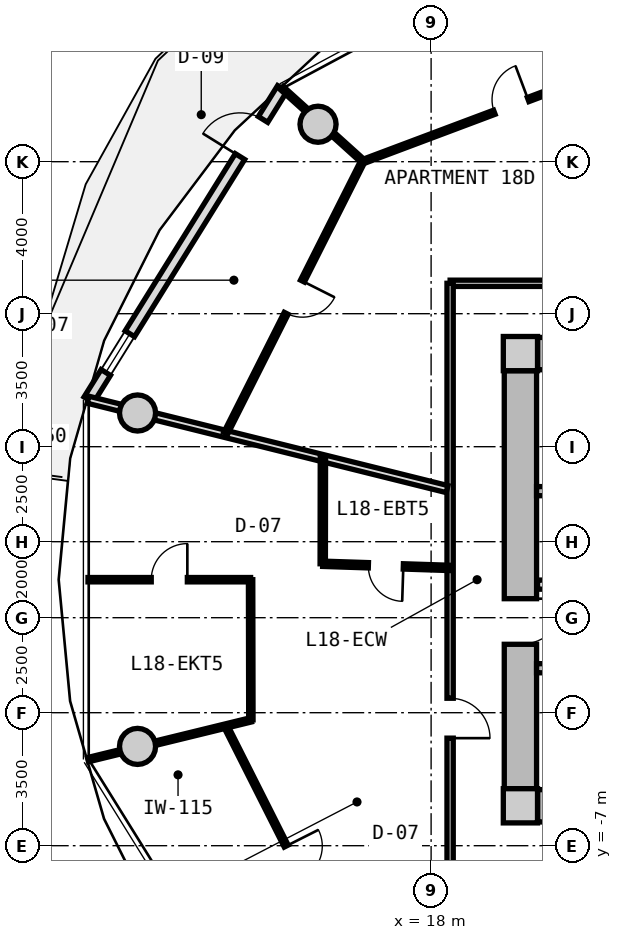
"""IFC4 building model, lengths in metres.
Left out: names, types, materials, properties, quantities, classifications, styles, units other than length and angle.
Written with IfcOpenShell. Run it as: python <this file> out.ifc"""

import sys

from ifc_helpers import new_model, si_unit, direction, frame, frame_2d, origin, origin_2d, place, context, subcontext, project, spatial, rectangle, circle, extrude, source, transform, mapped, element, fill, save


model = new_model("IFC4")
c1 = context("Model", 3, precision=1e-05, world=origin(), true_north=direction((0.0, 1.0)))
c2 = subcontext(c1, "Body", "Model", "MODEL_VIEW")
j1 = project(units=[si_unit("LENGTHUNIT", "METRE"), si_unit("PLANEANGLEUNIT", "RADIAN")], contexts=[c1])
p1 = place(None, origin())
s1 = spatial("IfcSite", under=j1, at=p1, CompositionType="ELEMENT")
p2 = place(p1, origin())
s2 = spatial("IfcBuilding", under=s1, at=p2, CompositionType="ELEMENT")
p3 = place(p2, frame((0.0, 0.0, 61.25)))
s3 = spatial("IfcBuildingStorey", under=s2, at=p3, CompositionType="ELEMENT", Elevation=61.25)
m1 = source(origin(), c2, "Body", "SweptSolid", [
    extrude(rectangle(XDim=0.9, YDim=0.9, at=origin_2d()), origin(), (0.0, 0.0, 1.0), 3.05),
])
for number, where, z_axis, x_axis in (
    (1, (20.35, -5.95, 0.0), (0.0, 0.0, 1.0), (1.0, 0.0, 0.0)),
    (2, (20.35, 5.95, 0.0), (0.0, 0.0, 1.0), (1.0, 0.0, 0.0)),
):
    element("IfcColumn", number, at=place(p3, frame(where, z_axis=z_axis, x_axis=x_axis)), inside=s3, PredefinedType="COLUMN", context=c2, shape_type="MappedRepresentation", body=[
        mapped(m1, transform((0.0, 0.0, 0.0), x_axis=(1.0, 0.0, 0.0), y_axis=(0.0, 1.0, 0.0), z_axis=(0.0, 0.0, 1.0), scale=1.0)),
    ])
m2 = source(origin(), c2, "Body", "SweptSolid", [
    extrude(rectangle(XDim=14.4, YDim=0.85, at=frame_2d((7.2, 0.0))), origin(), (0.0, 0.0, 1.0), 2.79),
])
for number, where, z_axis, x_axis in (
    (3, (20.8, 5.95, 0.0), (0.0, 0.0, 1.0), (1.0, 0.0, 0.0)),
    (4, (35.2, -5.95, 0.0), (0.0, 0.0, 1.0), (-1.0, 0.0, 0.0)),
):
    element("IfcWall", number, at=place(p3, frame(where, z_axis=z_axis, x_axis=x_axis)), inside=s3, PredefinedType="SHEAR", context=c2, shape_type="MappedRepresentation", body=[
        mapped(m2, transform((0.0, 0.0, 0.0), x_axis=(1.0, 0.0, 0.0), y_axis=(0.0, 1.0, 0.0), z_axis=(0.0, 0.0, 1.0), scale=1.0)),
    ])
m3 = source(origin(), c2, "Body", "SweptSolid", [
    extrude(rectangle(XDim=11.0, YDim=0.85, at=frame_2d((5.5, 0.0))), origin(), (0.0, 0.0, 1.0), 2.79),
])
p4 = place(p3, frame((20.35, -5.5, 0.0), z_axis=(0.0, 0.0, 1.0), x_axis=(0.0, 1.0, 0.0)))
e5 = element("IfcWall", 5, at=p4, inside=s3, PredefinedType="SHEAR", context=c2, shape_type="MappedRepresentation", body=[
    mapped(m3, transform((0.0, 0.0, 0.0), x_axis=(1.0, 0.0, 0.0), y_axis=(0.0, 1.0, 0.0), z_axis=(0.0, 0.0, 1.0), scale=1.0)),
])
p5 = place(p4, frame((3.8, 0.0, 0.0)))
e6 = element("IfcOpeningElement", 6, at=p5, cuts=e5, PredefinedType="OPENING", context=c2, shape_type="SweptSolid", body=[
    extrude(rectangle(XDim=1.2, YDim=2.15, at=frame_2d((0.6, 1.075))), frame((0.0, 0.435, 0.0), z_axis=(0.0, -1.0, 0.0), x_axis=(1.0, 0.0, 0.0)), (0.0, 0.0, 1.0), 0.87),
])
m4 = source(origin(), c2, "Body", "SweptSolid", [
    extrude(circle(Radius=0.475, at=origin_2d()), origin(), (0.0, 0.0, 1.0), 3.05),
])
for number, where, z_axis, x_axis in (
    (7, (15.025, 11.985, 0.0), (0.0, 0.0, 1.0), (1.0, 0.0, 0.0)),
    (8, (10.275, 4.387, 0.0), (0.0, 0.0, 1.0), (1.0, 0.0, 0.0)),
    (9, (10.275, -4.387, 0.0), (0.0, 0.0, 1.0), (1.0, 0.0, 0.0)),
):
    element("IfcColumn", number, at=place(p3, frame(where, z_axis=z_axis, x_axis=x_axis)), inside=s3, PredefinedType="COLUMN", context=c2, shape_type="MappedRepresentation", body=[
        mapped(m4, transform((0.0, 0.0, 0.0), x_axis=(1.0, 0.0, 0.0), y_axis=(0.0, 1.0, 0.0), z_axis=(0.0, 0.0, 1.0), scale=1.0)),
    ])
m5 = source(origin(), c2, "Body", "SweptSolid", [
    extrude(rectangle(XDim=9.649, YDim=0.29, at=frame_2d((4.824, 0.0))), origin(), (0.0, 0.0, 1.0), 2.79),
])
p6 = place(p3, frame((8.99, 4.731, 0.0), z_axis=(0.0, 0.0, 1.0), x_axis=(0.527909458386, 0.849300655684, 0.0)))
e10 = element("IfcWall", 10, at=p6, inside=s3, PredefinedType="SOLIDWALL", context=c2, shape_type="MappedRepresentation", body=[
    mapped(m5, transform((0.0, 0.0, 0.0), x_axis=(1.0, 0.0, 0.0), y_axis=(0.0, 1.0, 0.0), z_axis=(0.0, 0.0, 1.0), scale=1.0)),
])
p7 = place(p6, frame((7.54, 0.0, 0.0)))
e11 = element("IfcOpeningElement", 11, at=p7, cuts=e10, PredefinedType="OPENING", context=c2, shape_type="SweptSolid", body=[
    extrude(rectangle(XDim=1.15, YDim=2.25, at=frame_2d((0.575, 1.125))), frame((0.0, 0.155, 0.0), z_axis=(0.0, -1.0, 0.0), x_axis=(1.0, 0.0, 0.0)), (0.0, 0.0, 1.0), 0.31),
])
p8 = place(p6, frame((0.85, 0.0, 0.85)))
e12 = element("IfcOpeningElement", 12, at=p8, cuts=e10, PredefinedType="OPENING", context=c2, shape_type="SweptSolid", body=[
    extrude(rectangle(XDim=1.2, YDim=1.5, at=frame_2d((0.6, 0.75))), frame((0.0, 0.155, 0.0), z_axis=(0.0, -1.0, 0.0), x_axis=(1.0, 0.0, 0.0)), (0.0, 0.0, 1.0), 0.31),
])
m6 = source(origin(), c2, "Body", "SweptSolid", [
    extrude(rectangle(XDim=7.765, YDim=0.24, at=frame_2d((3.883, 0.0))), origin(), (0.0, 0.0, 1.0), 2.79),
])
p9 = place(p3, frame((20.775, 2.33, 0.0), z_axis=(0.0, 0.0, 1.0), x_axis=(1.0, 0.0, 0.0)))
e13 = element("IfcWall", 13, at=p9, inside=s3, PredefinedType="PARTITIONING", context=c2, shape_type="MappedRepresentation", body=[
    mapped(m6, transform((0.0, 0.0, 0.0), x_axis=(1.0, 0.0, 0.0), y_axis=(0.0, 1.0, 0.0), z_axis=(0.0, 0.0, 1.0), scale=1.0)),
])
p10 = place(p3, frame((20.775, -2.33, 0.0), z_axis=(0.0, 0.0, 1.0), x_axis=(1.0, 0.0, 0.0)))
e14 = element("IfcWall", 14, at=p10, inside=s3, PredefinedType="PARTITIONING", context=c2, shape_type="MappedRepresentation", body=[
    mapped(m6, transform((0.0, 0.0, 0.0), x_axis=(1.0, 0.0, 0.0), y_axis=(0.0, 1.0, 0.0), z_axis=(0.0, 0.0, 1.0), scale=1.0)),
])
p11 = place(p10, frame((0.885, 0.0, 0.0)))
e15 = element("IfcOpeningElement", 15, at=p11, cuts=e14, PredefinedType="OPENING", context=c2, shape_type="SweptSolid", body=[
    extrude(rectangle(XDim=1.1, YDim=2.15, at=frame_2d((0.55, 1.075))), frame((0.0, 0.13, 0.0), z_axis=(0.0, -1.0, 0.0), x_axis=(1.0, 0.0, 0.0)), (0.0, 0.0, 1.0), 0.26),
])
m7 = source(origin(), c2, "Body", "SweptSolid", [
    extrude(rectangle(XDim=7.62, YDim=0.24, at=frame_2d((3.81, 0.0))), origin(), (0.0, 0.0, 1.0), 2.775),
])
p12 = place(p3, frame((20.8, -0.13, 0.0), z_axis=(0.0, 0.0, 1.0), x_axis=(1.0, 0.0, 0.0)))
e16 = element("IfcWall", 16, at=p12, inside=s3, PredefinedType="PARTITIONING", context=c2, shape_type="MappedRepresentation", body=[
    mapped(m7, transform((0.0, 0.0, 0.0), x_axis=(1.0, 0.0, 0.0), y_axis=(0.0, 1.0, 0.0), z_axis=(0.0, 0.0, 1.0), scale=1.0)),
])
p13 = place(p12, frame((6.22, 0.0, 0.0)))
e17 = element("IfcOpeningElement", 17, at=p13, cuts=e16, PredefinedType="OPENING", context=c2, shape_type="SweptSolid", body=[
    extrude(rectangle(XDim=1.0, YDim=2.1, at=frame_2d((0.5, 1.05))), frame((0.0, 0.13, 0.0), z_axis=(0.0, -1.0, 0.0), x_axis=(1.0, 0.0, 0.0)), (0.0, 0.0, 1.0), 0.26),
])
p14 = place(p12, frame((0.85, 0.0, 0.0)))
e18 = element("IfcOpeningElement", 18, at=p14, cuts=e16, PredefinedType="OPENING", context=c2, shape_type="SweptSolid", body=[
    extrude(rectangle(XDim=1.1, YDim=2.2, at=frame_2d((0.55, 1.1))), frame((0.0, 0.13, 0.0), z_axis=(0.0, -1.0, 0.0), x_axis=(1.0, 0.0, 0.0)), (0.0, 0.0, 1.0), 0.26),
])
p15 = place(p12, frame((3.85, 0.0, 0.0)))
e19 = element("IfcOpeningElement", 19, at=p15, cuts=e16, PredefinedType="OPENING", context=c2, shape_type="SweptSolid", body=[
    extrude(rectangle(XDim=1.1, YDim=2.2, at=frame_2d((0.55, 1.1))), frame((0.0, 0.13, 0.0), z_axis=(0.0, -1.0, 0.0), x_axis=(1.0, 0.0, 0.0)), (0.0, 0.0, 1.0), 0.26),
])
m8 = source(origin(), c2, "Body", "SweptSolid", [
    extrude(rectangle(XDim=19.0, YDim=0.165, at=frame_2d((9.5, 0.0))), origin(), (0.0, 0.0, 1.0), 2.775),
])
p16 = place(p3, frame((18.5, 7.8, 0.0), z_axis=(0.0, 0.0, 1.0), x_axis=(1.0, 0.0, 0.0)))
e20 = element("IfcWall", 20, at=p16, inside=s3, PredefinedType="PARTITIONING", context=c2, shape_type="MappedRepresentation", body=[
    mapped(m8, transform((0.0, 0.0, 0.0), x_axis=(1.0, 0.0, 0.0), y_axis=(0.0, 1.0, 0.0), z_axis=(0.0, 0.0, 1.0), scale=1.0)),
])
p17 = place(p16, frame((6.961, 0.0, 0.0)))
e21 = element("IfcOpeningElement", 21, at=p17, cuts=e20, PredefinedType="OPENING", context=c2, shape_type="SweptSolid", body=[
    extrude(rectangle(XDim=1.05, YDim=2.15, at=frame_2d((0.525, 1.075))), frame((0.0, 0.093, 0.0), z_axis=(0.0, -1.0, 0.0), x_axis=(1.0, 0.0, 0.0)), (0.0, 0.0, 1.0), 0.185),
])
m9 = source(origin(), c2, "Body", "SweptSolid", [
    extrude(rectangle(XDim=15.6, YDim=0.165, at=frame_2d((7.8, 0.0))), origin(), (0.0, 0.0, 1.0), 2.775),
])
p18 = place(p3, frame((18.5, -7.8, 0.0), z_axis=(0.0, 0.0, 1.0), x_axis=(0.0, 1.0, 0.0)))
e22 = element("IfcWall", 22, at=p18, inside=s3, PredefinedType="PARTITIONING", context=c2, shape_type="MappedRepresentation", body=[
    mapped(m9, transform((0.0, 0.0, 0.0), x_axis=(1.0, 0.0, 0.0), y_axis=(0.0, 1.0, 0.0), z_axis=(0.0, 0.0, 1.0), scale=1.0)),
])
p19 = place(p18, frame((3.63, 0.0, 0.0)))
e23 = element("IfcOpeningElement", 23, at=p19, cuts=e22, PredefinedType="OPENING", context=c2, shape_type="SweptSolid", body=[
    extrude(rectangle(XDim=1.05, YDim=2.15, at=frame_2d((0.525, 1.075))), frame((0.0, 0.093, 0.0), z_axis=(0.0, -1.0, 0.0), x_axis=(1.0, 0.0, 0.0)), (0.0, 0.0, 1.0), 0.185),
])
m10 = source(origin(), c2, "Body", "SweptSolid", [
    extrude(rectangle(XDim=9.737, YDim=0.19, at=frame_2d((4.869, 0.0))), origin(), (0.0, 0.0, 1.0), 2.225),
])
p20 = place(p3, frame((18.42, 2.385, 0.0), z_axis=(0.0, 0.0, 1.0), x_axis=(-0.970392716238, 0.241532557375, 0.0)))
e24 = element("IfcWall", 24, at=p20, inside=s3, PredefinedType="PARTITIONING", context=c2, shape_type="MappedRepresentation", body=[
    mapped(m10, transform((0.0, 0.0, 0.0), x_axis=(1.0, 0.0, 0.0), y_axis=(0.0, 1.0, 0.0), z_axis=(0.0, 0.0, 1.0), scale=1.0)),
])
m11 = source(origin(), c2, "Body", "SweptSolid", [
    extrude(rectangle(XDim=8.018, YDim=0.115, at=frame_2d((4.009, 0.0))), origin(), (0.0, 0.0, 1.0), 2.775),
])
p21 = place(p3, frame((12.596, -3.854, 0.0), z_axis=(0.0, 0.0, 1.0), x_axis=(0.450134355233, -0.89296084026, 0.0)))
e25 = element("IfcWall", 25, at=p21, inside=s3, PredefinedType="PARTITIONING", context=c2, shape_type="MappedRepresentation", body=[
    mapped(m11, transform((0.0, 0.0, 0.0), x_axis=(1.0, 0.0, 0.0), y_axis=(0.0, 1.0, 0.0), z_axis=(0.0, 0.0, 1.0), scale=1.0)),
])
p22 = place(p21, frame((3.534, 0.0, 0.0)))
e26 = element("IfcOpeningElement", 26, at=p22, cuts=e25, PredefinedType="OPENING", context=c2, shape_type="SweptSolid", body=[
    extrude(rectangle(XDim=0.95, YDim=2.1, at=frame_2d((0.475, 1.05))), frame((0.0, 0.067, 0.0), z_axis=(0.0, -1.0, 0.0), x_axis=(1.0, 0.0, 0.0)), (0.0, 0.0, 1.0), 0.135),
])
m12 = source(origin(), c2, "Body", "SweptSolid", [
    extrude(rectangle(XDim=4.414, YDim=0.115, at=frame_2d((2.207, 0.0))), origin(), (0.0, 0.0, 1.0), 2.225),
])
p23 = place(p3, frame((13.259, -3.688, 0.0), z_axis=(0.0, 0.0, 1.0), x_axis=(-0.971401274504, -0.237443812073, 0.0)))
e27 = element("IfcWall", 27, at=p23, inside=s3, PredefinedType="PARTITIONING", context=c2, shape_type="MappedRepresentation", body=[
    mapped(m12, transform((0.0, 0.0, 0.0), x_axis=(1.0, 0.0, 0.0), y_axis=(0.0, 1.0, 0.0), z_axis=(0.0, 0.0, 1.0), scale=1.0)),
])
m13 = source(origin(), c2, "Body", "SweptSolid", [
    extrude(rectangle(XDim=3.323, YDim=0.14, at=frame_2d((1.662, 0.0))), origin(), (0.0, 0.0, 1.0), 2.775),
])
p24 = place(p3, frame((18.47, 0.311, 0.0), z_axis=(0.0, 0.0, 1.0), x_axis=(-0.999467979553, 0.032615300817, 0.0)))
e28 = element("IfcWall", 28, at=p24, inside=s3, PredefinedType="PARTITIONING", context=c2, shape_type="MappedRepresentation", body=[
    mapped(m13, transform((0.0, 0.0, 0.0), x_axis=(1.0, 0.0, 0.0), y_axis=(0.0, 1.0, 0.0), z_axis=(0.0, 0.0, 1.0), scale=1.0)),
])
p25 = place(p24, frame((1.202, 0.0, 0.0)))
e29 = element("IfcOpeningElement", 29, at=p25, cuts=e28, PredefinedType="OPENING", context=c2, shape_type="SweptSolid", body=[
    extrude(rectangle(XDim=0.92, YDim=2.1, at=frame_2d((0.46, 1.05))), frame((0.0, 0.08, 0.0), z_axis=(0.0, -1.0, 0.0), x_axis=(1.0, 0.0, 0.0)), (0.0, 0.0, 1.0), 0.16),
])
m14 = source(origin(), c2, "Body", "SweptSolid", [
    extrude(rectangle(XDim=2.795, YDim=0.14, at=frame_2d((1.397, 0.0))), origin(), (0.0, 0.0, 1.0), 2.775),
])
p26 = place(p3, frame((15.148, 0.419, 0.0), z_axis=(0.0, 0.0, 1.0), x_axis=(0.001659531299, 0.999998622977, 0.0)))
e30 = element("IfcWall", 30, at=p26, inside=s3, PredefinedType="PARTITIONING", context=c2, shape_type="MappedRepresentation", body=[
    mapped(m14, transform((0.0, 0.0, 0.0), x_axis=(1.0, 0.0, 0.0), y_axis=(0.0, 1.0, 0.0), z_axis=(0.0, 0.0, 1.0), scale=1.0)),
])
m15 = source(origin(), c2, "Body", "SweptSolid", [
    extrude(rectangle(XDim=4.279, YDim=0.115, at=frame_2d((2.139, 0.0))), origin(), (0.0, 0.0, 1.0), 2.775),
])
p27 = place(p3, frame((13.25, 0.0, 0.0), z_axis=(0.0, 0.0, 1.0), x_axis=(-1.0, 0.0, 0.0)))
e31 = element("IfcWall", 31, at=p27, inside=s3, PredefinedType="PARTITIONING", context=c2, shape_type="MappedRepresentation", body=[
    mapped(m15, transform((0.0, 0.0, 0.0), x_axis=(1.0, 0.0, 0.0), y_axis=(0.0, 1.0, 0.0), z_axis=(0.0, 0.0, 1.0), scale=1.0)),
])
p28 = place(p27, frame((1.664, 0.0, 0.0)))
e32 = element("IfcOpeningElement", 32, at=p28, cuts=e31, PredefinedType="OPENING", context=c2, shape_type="SweptSolid", body=[
    extrude(rectangle(XDim=0.95, YDim=2.1, at=frame_2d((0.475, 1.05))), frame((0.0, 0.067, 0.0), z_axis=(0.0, -1.0, 0.0), x_axis=(1.0, 0.0, 0.0)), (0.0, 0.0, 1.0), 0.135),
])
m16 = source(origin(), c2, "Body", "SweptSolid", [
    extrude(rectangle(XDim=3.689, YDim=0.115, at=frame_2d((1.844, 0.0))), origin(), (0.0, 0.0, 1.0), 2.775),
])
p29 = place(p3, frame((13.25, 0.0, 0.0), z_axis=(0.0, 0.0, 1.0), x_axis=(0.001919382261, -0.999998157984, 0.0)))
e33 = element("IfcWall", 33, at=p29, inside=s3, PredefinedType="PARTITIONING", context=c2, shape_type="MappedRepresentation", body=[
    mapped(m16, transform((0.0, 0.0, 0.0), x_axis=(1.0, 0.0, 0.0), y_axis=(0.0, 1.0, 0.0), z_axis=(0.0, 0.0, 1.0), scale=1.0)),
])
m17 = source(origin(), c2, "Body", "SweptSolid", [
    extrude(rectangle(XDim=8.32, YDim=0.115, at=frame_2d((4.16, 0.0))), origin(), (0.0, 0.0, 1.0), 2.775),
])
p30 = place(p3, frame((24.003, 13.93, 0.0), z_axis=(0.0, 0.0, 1.0), x_axis=(-0.936180763098, -0.351518959382, 0.0)))
e34 = element("IfcWall", 34, at=p30, inside=s3, PredefinedType="PARTITIONING", context=c2, shape_type="MappedRepresentation", body=[
    mapped(m17, transform((0.0, 0.0, 0.0), x_axis=(1.0, 0.0, 0.0), y_axis=(0.0, 1.0, 0.0), z_axis=(0.0, 0.0, 1.0), scale=1.0)),
])
p31 = place(p30, frame((3.685, 0.0, 0.0)))
e35 = element("IfcOpeningElement", 35, at=p31, cuts=e34, PredefinedType="OPENING", context=c2, shape_type="SweptSolid", body=[
    extrude(rectangle(XDim=0.95, YDim=2.1, at=frame_2d((0.475, 1.05))), frame((0.0, 0.067, 0.0), z_axis=(0.0, -1.0, 0.0), x_axis=(1.0, 0.0, 0.0)), (0.0, 0.0, 1.0), 0.135),
])
p32 = place(p3, frame((16.205, 11.014, 0.0), z_axis=(0.0, 0.0, 1.0), x_axis=(-0.450134355233, -0.89296084026, 0.0)))
e36 = element("IfcWall", 36, at=p32, inside=s3, PredefinedType="PARTITIONING", context=c2, shape_type="MappedRepresentation", body=[
    mapped(m11, transform((0.0, 0.0, 0.0), x_axis=(1.0, 0.0, 0.0), y_axis=(0.0, 1.0, 0.0), z_axis=(0.0, 0.0, 1.0), scale=1.0)),
])
p33 = place(p32, frame((3.534, 0.0, 0.0)))
e37 = element("IfcOpeningElement", 37, at=p33, cuts=e36, PredefinedType="OPENING", context=c2, shape_type="SweptSolid", body=[
    extrude(rectangle(XDim=0.95, YDim=2.1, at=frame_2d((0.475, 1.05))), frame((0.0, 0.067, 0.0), z_axis=(0.0, -1.0, 0.0), x_axis=(1.0, 0.0, 0.0)), (0.0, 0.0, 1.0), 0.135),
])
m18 = source(origin(), c2, "Body", "SweptSolid", [
    extrude(rectangle(XDim=2.875, YDim=0.115, at=frame_2d((1.438, 0.0))), origin(), (0.0, 0.0, 1.0), 2.225),
])
p34 = place(p3, frame((16.205, 11.014, 0.0), z_axis=(0.0, 0.0, 1.0), x_axis=(-0.742512588127, 0.669832110661, 0.0)))
e38 = element("IfcWall", 38, at=p34, inside=s3, PredefinedType="PARTITIONING", context=c2, shape_type="MappedRepresentation", body=[
    mapped(m18, transform((0.0, 0.0, 0.0), x_axis=(1.0, 0.0, 0.0), y_axis=(0.0, 1.0, 0.0), z_axis=(0.0, 0.0, 1.0), scale=1.0)),
])
m19 = source(origin(), c2, "Body", "SweptSolid", [
    extrude(rectangle(XDim=1.15, YDim=2.25, at=frame_2d((0.575, 1.125))), frame((0.0, 0.025, 0.0), z_axis=(0.0, -1.0, 0.0), x_axis=(1.0, 0.0, 0.0)), (0.0, 0.0, 1.0), 0.05),
])
p35 = place(p7, origin())
e39 = element("IfcDoor", 39, at=p35, inside=s3, OperationType="SINGLE_SWING_LEFT", PredefinedType="DOOR", context=c2, shape_type="MappedRepresentation", body=[
    mapped(m19, transform((0.0, 0.0, 0.0), x_axis=(1.0, 0.0, 0.0), y_axis=(0.0, 1.0, 0.0), z_axis=(0.0, 0.0, 1.0), scale=1.0)),
])
fill(e11, e39)
m20 = source(origin(), c2, "Body", "SweptSolid", [
    extrude(rectangle(XDim=1.2, YDim=1.5, at=frame_2d((0.6, 0.75))), frame((0.0, 0.03, 0.0), z_axis=(0.0, -1.0, 0.0), x_axis=(1.0, 0.0, 0.0)), (0.0, 0.0, 1.0), 0.06),
])
p36 = place(p8, origin())
e40 = element("IfcWindow", 40, at=p36, inside=s3, PartitioningType="SINGLE_PANEL", PredefinedType="WINDOW", context=c2, shape_type="MappedRepresentation", body=[
    mapped(m20, transform((0.0, 0.0, 0.0), x_axis=(1.0, 0.0, 0.0), y_axis=(0.0, 1.0, 0.0), z_axis=(0.0, 0.0, 1.0), scale=1.0)),
])
fill(e12, e40)
m21 = source(origin(), c2, "Body", "SweptSolid", [
    extrude(rectangle(XDim=1.2, YDim=2.15, at=frame_2d((0.6, 1.075))), frame((0.0, 0.025, 0.0), z_axis=(0.0, -1.0, 0.0), x_axis=(1.0, 0.0, 0.0)), (0.0, 0.0, 1.0), 0.05),
])
p37 = place(p5, frame((1.2, 0.0, 0.0), z_axis=(0.0, 0.0, 1.0), x_axis=(-1.0, 0.0, 0.0)))
e41 = element("IfcDoor", 41, at=p37, inside=s3, OperationType="SINGLE_SWING_LEFT", PredefinedType="DOOR", context=c2, shape_type="MappedRepresentation", body=[
    mapped(m21, transform((0.0, 0.0, 0.0), x_axis=(1.0, 0.0, 0.0), y_axis=(0.0, 1.0, 0.0), z_axis=(0.0, 0.0, 1.0), scale=1.0)),
])
fill(e6, e41)
m22 = source(origin(), c2, "Body", "SweptSolid", [
    extrude(rectangle(XDim=1.05, YDim=2.15, at=frame_2d((0.525, 1.075))), frame((0.0, 0.025, 0.0), z_axis=(0.0, -1.0, 0.0), x_axis=(1.0, 0.0, 0.0)), (0.0, 0.0, 1.0), 0.05),
])
p38 = place(p19, frame((1.05, 0.0, 0.0), z_axis=(0.0, 0.0, 1.0), x_axis=(-1.0, 0.0, 0.0)))
e42 = element("IfcDoor", 42, at=p38, inside=s3, OperationType="SINGLE_SWING_RIGHT", PredefinedType="DOOR", context=c2, shape_type="MappedRepresentation", body=[
    mapped(m22, transform((0.0, 0.0, 0.0), x_axis=(1.0, 0.0, 0.0), y_axis=(0.0, 1.0, 0.0), z_axis=(0.0, 0.0, 1.0), scale=1.0)),
])
fill(e23, e42)
m23 = source(origin(), c2, "Body", "SweptSolid", [
    extrude(rectangle(XDim=0.92, YDim=2.1, at=frame_2d((0.46, 1.05))), frame((0.0, 0.025, 0.0), z_axis=(0.0, -1.0, 0.0), x_axis=(1.0, 0.0, 0.0)), (0.0, 0.0, 1.0), 0.05),
])
p39 = place(p25, origin())
e43 = element("IfcDoor", 43, at=p39, inside=s3, OperationType="SINGLE_SWING_LEFT", PredefinedType="DOOR", context=c2, shape_type="MappedRepresentation", body=[
    mapped(m23, transform((0.0, 0.0, 0.0), x_axis=(1.0, 0.0, 0.0), y_axis=(0.0, 1.0, 0.0), z_axis=(0.0, 0.0, 1.0), scale=1.0)),
])
fill(e29, e43)
m24 = source(origin(), c2, "Body", "SweptSolid", [
    extrude(rectangle(XDim=0.95, YDim=2.1, at=frame_2d((0.475, 1.05))), frame((0.0, 0.025, 0.0), z_axis=(0.0, -1.0, 0.0), x_axis=(1.0, 0.0, 0.0)), (0.0, 0.0, 1.0), 0.05),
])
p40 = place(p28, frame((0.95, 0.0, 0.0), z_axis=(0.0, 0.0, 1.0), x_axis=(-1.0, 0.0, 0.0)))
e44 = element("IfcDoor", 44, at=p40, inside=s3, OperationType="SINGLE_SWING_RIGHT", PredefinedType="DOOR", context=c2, shape_type="MappedRepresentation", body=[
    mapped(m24, transform((0.0, 0.0, 0.0), x_axis=(1.0, 0.0, 0.0), y_axis=(0.0, 1.0, 0.0), z_axis=(0.0, 0.0, 1.0), scale=1.0)),
])
fill(e32, e44)
p41 = place(p22, origin())
e45 = element("IfcDoor", 45, at=p41, inside=s3, OperationType="SINGLE_SWING_LEFT", PredefinedType="DOOR", context=c2, shape_type="MappedRepresentation", body=[
    mapped(m24, transform((0.0, 0.0, 0.0), x_axis=(1.0, 0.0, 0.0), y_axis=(0.0, 1.0, 0.0), z_axis=(0.0, 0.0, 1.0), scale=1.0)),
])
fill(e26, e45)
p42 = place(p31, frame((0.95, 0.0, 0.0), z_axis=(0.0, 0.0, 1.0), x_axis=(-1.0, 0.0, 0.0)))
e46 = element("IfcDoor", 46, at=p42, inside=s3, OperationType="SINGLE_SWING_RIGHT", PredefinedType="DOOR", context=c2, shape_type="MappedRepresentation", body=[
    mapped(m24, transform((0.0, 0.0, 0.0), x_axis=(1.0, 0.0, 0.0), y_axis=(0.0, 1.0, 0.0), z_axis=(0.0, 0.0, 1.0), scale=1.0)),
])
fill(e35, e46)
p43 = place(p33, origin())
e47 = element("IfcDoor", 47, at=p43, inside=s3, OperationType="SINGLE_SWING_LEFT", PredefinedType="DOOR", context=c2, shape_type="MappedRepresentation", body=[
    mapped(m24, transform((0.0, 0.0, 0.0), x_axis=(1.0, 0.0, 0.0), y_axis=(0.0, 1.0, 0.0), z_axis=(0.0, 0.0, 1.0), scale=1.0)),
])
fill(e37, e47)
save(model, sys.argv[1])
